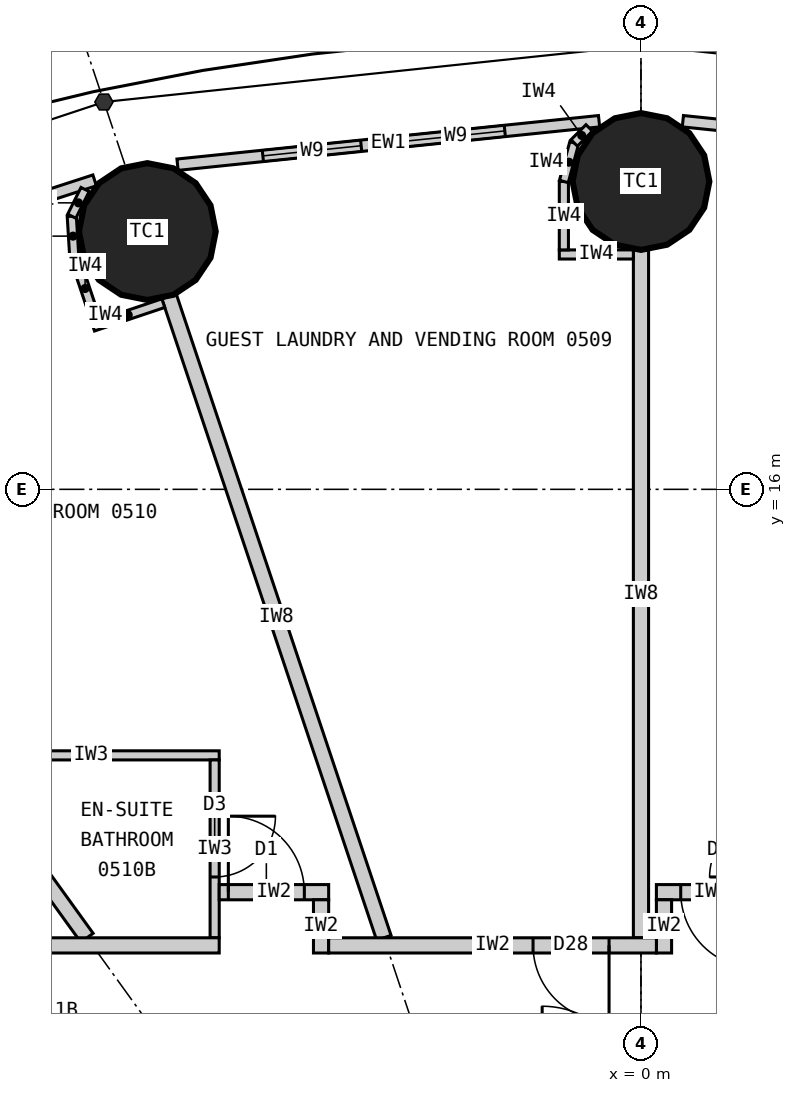
"""IFC4 building model, lengths in metres.
Left out: names, types, materials, properties, quantities, classifications, styles, units other than length and angle.
Written with IfcOpenShell. Run it as: python <this file> out.ifc"""

import sys

from ifc_helpers import new_model, si_unit, direction, frame, frame_2d, origin, origin_2d, place, context, subcontext, project, spatial, rectangle, circle, extrude, element, fill, save


model = new_model("IFC4")
c1 = context("Model", 3, precision=1e-05, world=origin(), true_north=direction((0.0, 1.0)))
c2 = subcontext(c1, "Body", "Model", "MODEL_VIEW")
j1 = project(units=[si_unit("LENGTHUNIT", "METRE"), si_unit("PLANEANGLEUNIT", "RADIAN")], contexts=[c1])
p1 = place(None, origin())
s1 = spatial("IfcSite", under=j1, at=p1, CompositionType="ELEMENT")
p2 = place(p1, origin())
s2 = spatial("IfcBuilding", under=s1, at=p2, CompositionType="ELEMENT")
p3 = place(p2, frame((0.0, 0.0, 29.4)))
s3 = spatial("IfcBuildingStorey", under=s2, at=p3, CompositionType="ELEMENT", Elevation=29.4)
for number, where, z_axis, x_axis in (
    (1, (0.0, 20.05, 0.0), (0.0, 0.0, 1.0), (1.0, 0.0, 0.0)),
    (2, (-6.495, 19.391, 0.0), (0.0, 0.0, 1.0), (1.0, 0.0, 0.0)),
):
    element("IfcColumn", number, at=place(p3, frame(where, z_axis=z_axis, x_axis=x_axis)), inside=s3, PredefinedType="COLUMN", context=c2, shape_type="SweptSolid", body=[
        extrude(circle(Radius=0.9, at=origin_2d()), origin(), (0.0, 0.0, 1.0), 3.3),
    ])
p4 = place(p3, frame((6.098, 20.271, 0.0), z_axis=(0.0, 0.0, 1.0), x_axis=(-0.994723735084, 0.102589915983, 0.0)))
e3 = element("IfcWall", 3, at=p4, inside=s3, PredefinedType="ELEMENTEDWALL", context=c2, shape_type="SweptSolid", body=[
    extrude(rectangle(XDim=5.576, YDim=0.15, at=frame_2d((2.788, 0.0))), origin(), (0.0, 0.0, 1.0), 3.12),
])
p5 = place(p4, frame((1.129, 0.0, 0.9)))
e4 = element("IfcOpeningElement", 4, at=p5, cuts=e3, PredefinedType="OPENING", context=c2, shape_type="SweptSolid", body=[
    extrude(rectangle(XDim=1.3, YDim=1.9, at=frame_2d((0.65, 0.95))), frame((0.0, 0.085, 0.0), z_axis=(0.0, -1.0, 0.0), x_axis=(1.0, 0.0, 0.0)), (0.0, 0.0, 1.0), 0.17),
])
p6 = place(p4, frame((3.029, 0.0, 0.9)))
e5 = element("IfcOpeningElement", 5, at=p6, cuts=e3, PredefinedType="OPENING", context=c2, shape_type="SweptSolid", body=[
    extrude(rectangle(XDim=1.3, YDim=1.9, at=frame_2d((0.65, 0.95))), frame((0.0, 0.085, 0.0), z_axis=(0.0, -1.0, 0.0), x_axis=(1.0, 0.0, 0.0)), (0.0, 0.0, 1.0), 0.17),
])
p7 = place(p3, frame((-0.551, 20.843, 0.0), z_axis=(0.0, 0.0, 1.0), x_axis=(-0.994723735084, -0.102589915983, 0.0)))
e6 = element("IfcWall", 6, at=p7, inside=s3, PredefinedType="ELEMENTEDWALL", context=c2, shape_type="SweptSolid", body=[
    extrude(rectangle(XDim=5.576, YDim=0.15, at=frame_2d((2.788, 0.0))), origin(), (0.0, 0.0, 1.0), 3.12),
])
p8 = place(p7, frame((1.247, 0.0, 0.9)))
e7 = element("IfcOpeningElement", 7, at=p8, cuts=e6, PredefinedType="OPENING", context=c2, shape_type="SweptSolid", body=[
    extrude(rectangle(XDim=1.3, YDim=1.9, at=frame_2d((0.65, 0.95))), frame((0.0, 0.085, 0.0), z_axis=(0.0, -1.0, 0.0), x_axis=(1.0, 0.0, 0.0)), (0.0, 0.0, 1.0), 0.17),
])
p9 = place(p7, frame((3.147, 0.0, 0.9)))
e8 = element("IfcOpeningElement", 8, at=p9, cuts=e6, PredefinedType="OPENING", context=c2, shape_type="SweptSolid", body=[
    extrude(rectangle(XDim=1.3, YDim=1.9, at=frame_2d((0.65, 0.95))), frame((0.0, 0.085, 0.0), z_axis=(0.0, -1.0, 0.0), x_axis=(1.0, 0.0, 0.0)), (0.0, 0.0, 1.0), 0.17),
])
p10 = place(p3, frame((-7.188, 20.065, 0.0), z_axis=(0.0, 0.0, 1.0), x_axis=(-0.951138486029, -0.308764603532, 0.0)))
e9 = element("IfcWall", 9, at=p10, inside=s3, PredefinedType="ELEMENTEDWALL", context=c2, shape_type="SweptSolid", body=[
    extrude(rectangle(XDim=5.444, YDim=0.15, at=frame_2d((2.722, 0.0))), origin(), (0.0, 0.0, 1.0), 3.12),
])
p11 = place(p10, frame((1.284, 0.0, 0.9)))
e10 = element("IfcOpeningElement", 10, at=p11, cuts=e9, PredefinedType="OPENING", context=c2, shape_type="SweptSolid", body=[
    extrude(rectangle(XDim=1.3, YDim=1.9, at=frame_2d((0.65, 0.95))), frame((0.0, 0.085, 0.0), z_axis=(0.0, -1.0, 0.0), x_axis=(1.0, 0.0, 0.0)), (0.0, 0.0, 1.0), 0.17),
])
p12 = place(p10, frame((3.184, 0.0, 0.9)))
e11 = element("IfcOpeningElement", 11, at=p12, cuts=e9, PredefinedType="OPENING", context=c2, shape_type="SweptSolid", body=[
    extrude(rectangle(XDim=1.3, YDim=1.9, at=frame_2d((0.65, 0.95))), frame((0.0, 0.085, 0.0), z_axis=(0.0, -1.0, 0.0), x_axis=(1.0, 0.0, 0.0)), (0.0, 0.0, 1.0), 0.17),
])
p13 = place(p3, frame((0.0, 10.1, 0.0), z_axis=(0.0, 0.0, 1.0), x_axis=(0.0, 1.0, 0.0)))
e12 = element("IfcWall", 12, at=p13, inside=s3, PredefinedType="PARTITIONING", context=c2, shape_type="SweptSolid", body=[
    extrude(rectangle(XDim=9.05, YDim=0.2, at=frame_2d((4.525, 0.0))), origin(), (0.0, 0.0, 1.0), 2.32),
])
p14 = place(p3, frame((-3.383, 10.1, 0.0), z_axis=(0.0, 0.0, 1.0), x_axis=(-0.317593727596, 0.948226884344, 0.0)))
e13 = element("IfcWall", 13, at=p14, inside=s3, PredefinedType="PARTITIONING", context=c2, shape_type="SweptSolid", body=[
    extrude(rectangle(XDim=8.899, YDim=0.2, at=frame_2d((4.449, 0.0))), origin(), (0.0, 0.0, 1.0), 2.32),
])
p15 = place(p3, frame((-7.289, 10.1, 0.0), z_axis=(0.0, 0.0, 1.0), x_axis=(-0.585216319319, 0.810877216108, 0.0)))
e14 = element("IfcWall", 14, at=p15, inside=s3, PredefinedType="PARTITIONING", context=c2, shape_type="SweptSolid", body=[
    extrude(rectangle(XDim=8.16, YDim=0.2, at=frame_2d((4.08, 0.0))), origin(), (0.0, 0.0, 1.0), 2.32),
])
p16 = place(p3, frame((-8.921, 12.5, 0.0), z_axis=(0.0, 0.0, 1.0), x_axis=(1.0, 0.0, 0.0)))
e15 = element("IfcWall", 15, at=p16, inside=s3, PredefinedType="PARTITIONING", context=c2, shape_type="SweptSolid", body=[
    extrude(rectangle(XDim=3.372, YDim=0.12, at=frame_2d((1.686, 0.0))), origin(), (0.0, 0.0, 1.0), 3.12),
])
p17 = place(p3, frame((-5.609, 10.1, 0.0), z_axis=(0.0, 0.0, 1.0), x_axis=(0.0, 1.0, 0.0)))
e16 = element("IfcWall", 16, at=p17, inside=s3, PredefinedType="PARTITIONING", context=c2, shape_type="SweptSolid", body=[
    extrude(rectangle(XDim=2.34, YDim=0.12, at=frame_2d((1.17, 0.0))), origin(), (0.0, 0.0, 1.0), 3.12),
])
p18 = place(p17, frame((0.8, 0.0, 0.0)))
e17 = element("IfcOpeningElement", 17, at=p18, cuts=e16, PredefinedType="OPENING", context=c2, shape_type="SweptSolid", body=[
    extrude(rectangle(XDim=0.8, YDim=2.1, at=frame_2d((0.4, 1.05))), frame((0.0, 0.07, 0.0), z_axis=(0.0, -1.0, 0.0), x_axis=(1.0, 0.0, 0.0)), (0.0, 0.0, 1.0), 0.14),
])
p19 = place(p3, frame((0.203, 10.7, 0.0), z_axis=(0.0, 0.0, 1.0), x_axis=(1.0, 0.0, 0.0)))
e18 = element("IfcWall", 18, at=p19, inside=s3, PredefinedType="PARTITIONING", context=c2, shape_type="SweptSolid", body=[
    extrude(rectangle(XDim=1.44, YDim=0.2, at=frame_2d((0.72, 0.0))), origin(), (0.0, 0.0, 1.0), 3.12),
])
p20 = place(p19, frame((0.32, 0.0, 0.0)))
e19 = element("IfcOpeningElement", 19, at=p20, cuts=e18, PredefinedType="OPENING", context=c2, shape_type="SweptSolid", body=[
    extrude(rectangle(XDim=1.0, YDim=2.2, at=frame_2d((0.5, 1.1))), frame((0.0, 0.11, 0.0), z_axis=(0.0, -1.0, 0.0), x_axis=(1.0, 0.0, 0.0)), (0.0, 0.0, 1.0), 0.22),
])
p21 = place(p3, frame((0.303, 9.9, 0.0), z_axis=(0.0, 0.0, 1.0), x_axis=(0.0, 1.0, 0.0)))
e20 = element("IfcWall", 20, at=p21, inside=s3, PredefinedType="PARTITIONING", context=c2, shape_type="SweptSolid", body=[
    extrude(rectangle(XDim=0.7, YDim=0.2, at=frame_2d((0.35, 0.0))), origin(), (0.0, 0.0, 1.0), 3.12),
])
p22 = place(p3, frame((-5.549, 10.7, 0.0), z_axis=(0.0, 0.0, 1.0), x_axis=(1.0, 0.0, 0.0)))
e21 = element("IfcWall", 21, at=p22, inside=s3, PredefinedType="PARTITIONING", context=c2, shape_type="SweptSolid", body=[
    extrude(rectangle(XDim=1.44, YDim=0.2, at=frame_2d((0.72, 0.0))), origin(), (0.0, 0.0, 1.0), 3.12),
])
p23 = place(p22, frame((0.12, 0.0, 0.0)))
e22 = element("IfcOpeningElement", 22, at=p23, cuts=e21, PredefinedType="OPENING", context=c2, shape_type="SweptSolid", body=[
    extrude(rectangle(XDim=1.0, YDim=2.2, at=frame_2d((0.5, 1.1))), frame((0.0, 0.11, 0.0), z_axis=(0.0, -1.0, 0.0), x_axis=(1.0, 0.0, 0.0)), (0.0, 0.0, 1.0), 0.22),
])
p24 = place(p3, frame((-4.209, 9.9, 0.0), z_axis=(0.0, 0.0, 1.0), x_axis=(0.0, 1.0, 0.0)))
e23 = element("IfcWall", 23, at=p24, inside=s3, PredefinedType="PARTITIONING", context=c2, shape_type="SweptSolid", body=[
    extrude(rectangle(XDim=0.7, YDim=0.2, at=frame_2d((0.35, 0.0))), origin(), (0.0, 0.0, 1.0), 3.12),
])
p25 = place(p3, frame((-10.179, 10.0, 0.0), z_axis=(0.0, 0.0, 1.0), x_axis=(1.0, 0.0, 0.0)))
e24 = element("IfcWall", 24, at=p25, inside=s3, PredefinedType="PARTITIONING", context=c2, shape_type="SweptSolid", body=[
    extrude(rectangle(XDim=4.63, YDim=0.2, at=frame_2d((2.315, 0.0))), origin(), (0.0, 0.0, 1.0), 3.12),
])
p26 = place(p3, frame((-4.109, 10.0, 0.0), z_axis=(0.0, 0.0, 1.0), x_axis=(1.0, 0.0, 0.0)))
e25 = element("IfcWall", 25, at=p26, inside=s3, PredefinedType="PARTITIONING", context=c2, shape_type="SweptSolid", body=[
    extrude(rectangle(XDim=4.312, YDim=0.2, at=frame_2d((2.156, 0.0))), origin(), (0.0, 0.0, 1.0), 3.12),
])
p27 = place(p26, frame((2.689, 0.0, 0.0)))
e26 = element("IfcOpeningElement", 26, at=p27, cuts=e25, PredefinedType="OPENING", context=c2, shape_type="SweptSolid", body=[
    extrude(rectangle(XDim=1.0, YDim=2.2, at=frame_2d((0.5, 1.1))), frame((0.0, 0.11, 0.0), z_axis=(0.0, -1.0, 0.0), x_axis=(1.0, 0.0, 0.0)), (0.0, 0.0, 1.0), 0.22),
])
p28 = place(p3, frame((-0.1, 19.09, 0.0), z_axis=(0.0, 0.0, 1.0), x_axis=(-1.0, 0.0, 0.0)))
e27 = element("IfcWall", 27, at=p28, inside=s3, PredefinedType="PARTITIONING", context=c2, shape_type="SweptSolid", body=[
    extrude(rectangle(XDim=0.974, YDim=0.12, at=frame_2d((0.487, 0.0))), origin(), (0.0, 0.0, 1.0), 3.12),
])
p29 = place(p3, frame((-1.015, 19.15, 0.0), z_axis=(0.0, 0.0, 1.0), x_axis=(0.0, 1.0, 0.0)))
e28 = element("IfcWall", 28, at=p29, inside=s3, PredefinedType="PARTITIONING", context=c2, shape_type="SweptSolid", body=[
    extrude(rectangle(XDim=0.9, YDim=0.12, at=frame_2d((0.45, 0.0))), origin(), (0.0, 0.0, 1.0), 3.12),
])
p30 = place(p3, frame((-1.015, 20.05, 0.0), z_axis=(0.0, 0.0, 1.0), x_axis=(0.258906465625, 0.96590239779, 0.0)))
e29 = element("IfcWall", 29, at=p30, inside=s3, PredefinedType="PARTITIONING", context=c2, shape_type="SweptSolid", body=[
    extrude(rectangle(XDim=0.525, YDim=0.12, at=frame_2d((0.263, 0.0))), origin(), (0.0, 0.0, 1.0), 3.12),
])
p31 = place(p3, frame((-0.879, 20.557, 0.0), z_axis=(0.0, 0.0, 1.0), x_axis=(0.707106781187, 0.707106781187, 0.0)))
e30 = element("IfcWall", 30, at=p31, inside=s3, PredefinedType="PARTITIONING", context=c2, shape_type="SweptSolid", body=[
    extrude(rectangle(XDim=0.279, YDim=0.12, at=frame_2d((0.14, 0.0))), origin(), (0.0, 0.0, 1.0), 3.12),
])
p32 = place(p3, frame((-6.285, 18.449, 0.0), z_axis=(0.0, 0.0, 1.0), x_axis=(-0.948281677008, -0.317430088446, 0.0)))
e31 = element("IfcWall", 31, at=p32, inside=s3, PredefinedType="PARTITIONING", context=c2, shape_type="SweptSolid", body=[
    extrude(rectangle(XDim=0.974, YDim=0.12, at=frame_2d((0.487, 0.0))), origin(), (0.0, 0.0, 1.0), 3.12),
])
p33 = place(p3, frame((-7.171, 18.216, 0.0), z_axis=(0.0, 0.0, 1.0), x_axis=(-0.317692409458, 0.94819382669, 0.0)))
e32 = element("IfcWall", 32, at=p33, inside=s3, PredefinedType="PARTITIONING", context=c2, shape_type="SweptSolid", body=[
    extrude(rectangle(XDim=0.9, YDim=0.12, at=frame_2d((0.45, 0.0))), origin(), (0.0, 0.0, 1.0), 3.12),
])
p34 = place(p3, frame((-7.457, 19.069, 0.0), z_axis=(0.0, 0.0, 1.0), x_axis=(-0.061365267648, 0.99811537606, 0.0)))
e33 = element("IfcWall", 33, at=p34, inside=s3, PredefinedType="PARTITIONING", context=c2, shape_type="SweptSolid", body=[
    extrude(rectangle(XDim=0.525, YDim=0.12, at=frame_2d((0.263, 0.0))), origin(), (0.0, 0.0, 1.0), 3.12),
])
p35 = place(p3, frame((-7.489, 19.593, 0.0), z_axis=(0.0, 0.0, 1.0), x_axis=(0.446218959337, 0.89492381817, 0.0)))
e34 = element("IfcWall", 34, at=p35, inside=s3, PredefinedType="PARTITIONING", context=c2, shape_type="SweptSolid", body=[
    extrude(rectangle(XDim=0.393, YDim=0.12, at=frame_2d((0.196, 0.0))), origin(), (0.0, 0.0, 1.0), 3.12),
])
p36 = place(p8, origin())
e35 = element("IfcWindow", 35, at=p36, inside=s3, PartitioningType="SINGLE_PANEL", PredefinedType="WINDOW", context=c2, shape_type="SweptSolid", body=[
    extrude(rectangle(XDim=1.3, YDim=1.9, at=frame_2d((0.65, 0.95))), frame((0.0, 0.03, 0.0), z_axis=(0.0, -1.0, 0.0), x_axis=(1.0, 0.0, 0.0)), (0.0, 0.0, 1.0), 0.06),
])
fill(e7, e35)
p37 = place(p9, origin())
e36 = element("IfcWindow", 36, at=p37, inside=s3, PartitioningType="SINGLE_PANEL", PredefinedType="WINDOW", context=c2, shape_type="SweptSolid", body=[
    extrude(rectangle(XDim=1.3, YDim=1.9, at=frame_2d((0.65, 0.95))), frame((0.0, 0.03, 0.0), z_axis=(0.0, -1.0, 0.0), x_axis=(1.0, 0.0, 0.0)), (0.0, 0.0, 1.0), 0.06),
])
fill(e8, e36)
p38 = place(p20, origin())
e37 = element("IfcDoor", 37, at=p38, inside=s3, OperationType="SINGLE_SWING_RIGHT", PredefinedType="DOOR", context=c2, shape_type="SweptSolid", body=[
    extrude(rectangle(XDim=1.0, YDim=2.2, at=frame_2d((0.5, 1.1))), frame((0.0, 0.025, 0.0), z_axis=(0.0, -1.0, 0.0), x_axis=(1.0, 0.0, 0.0)), (0.0, 0.0, 1.0), 0.05),
])
fill(e19, e37)
p39 = place(p27, origin())
e38 = element("IfcDoor", 38, at=p39, inside=s3, OperationType="SINGLE_SWING_RIGHT", PredefinedType="DOOR", context=c2, shape_type="SweptSolid", body=[
    extrude(rectangle(XDim=1.0, YDim=2.2, at=frame_2d((0.5, 1.1))), frame((0.0, 0.025, 0.0), z_axis=(0.0, -1.0, 0.0), x_axis=(1.0, 0.0, 0.0)), (0.0, 0.0, 1.0), 0.05),
])
fill(e26, e38)
p40 = place(p18, origin())
e39 = element("IfcDoor", 39, at=p40, inside=s3, OperationType="SINGLE_SWING_RIGHT", PredefinedType="DOOR", context=c2, shape_type="SweptSolid", body=[
    extrude(rectangle(XDim=0.8, YDim=2.1, at=frame_2d((0.4, 1.05))), frame((0.0, 0.025, 0.0), z_axis=(0.0, -1.0, 0.0), x_axis=(1.0, 0.0, 0.0)), (0.0, 0.0, 1.0), 0.05),
])
fill(e17, e39)
p41 = place(p23, origin())
e40 = element("IfcDoor", 40, at=p41, inside=s3, OperationType="SINGLE_SWING_LEFT", PredefinedType="DOOR", context=c2, shape_type="SweptSolid", body=[
    extrude(rectangle(XDim=1.0, YDim=2.2, at=frame_2d((0.5, 1.1))), frame((0.0, 0.025, 0.0), z_axis=(0.0, -1.0, 0.0), x_axis=(1.0, 0.0, 0.0)), (0.0, 0.0, 1.0), 0.05),
])
fill(e22, e40)
save(model, sys.argv[1])
